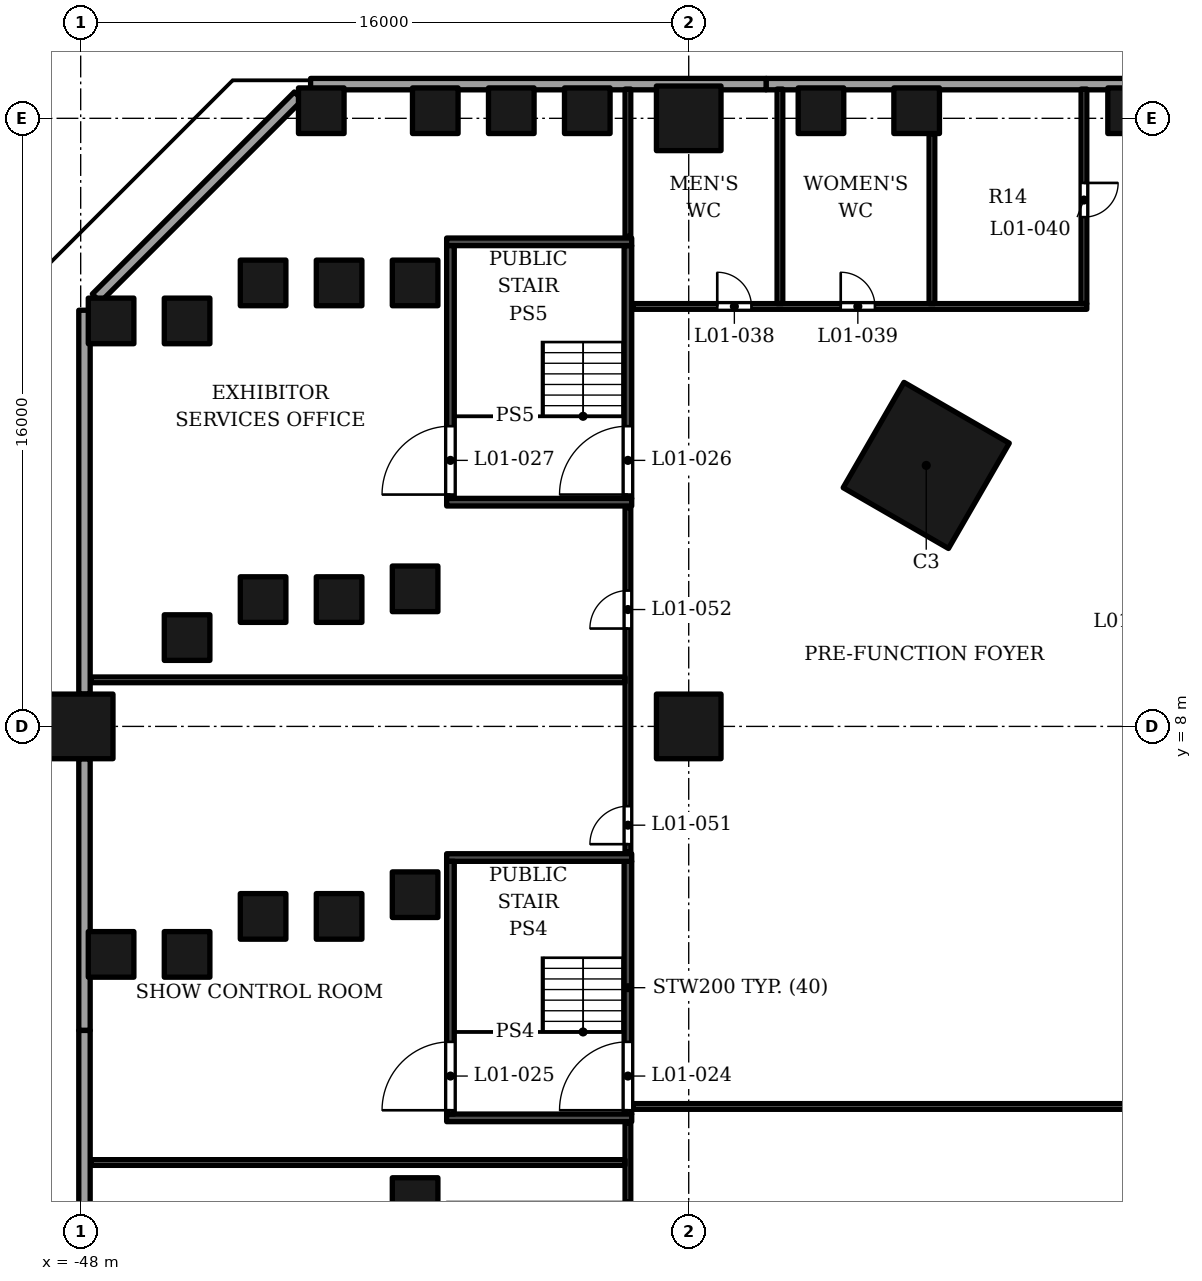
"""IFC4 building model, lengths in metres.
Left out: names, types, materials, properties, quantities, classifications, styles, units other than length and angle.
Written with IfcOpenShell. Run it as: python <this file> out.ifc"""

import sys

from ifc_helpers import new_model, si_unit, direction, frame, frame_2d, origin, origin_2d, place, context, subcontext, project, spatial, rectangle, extrude, element, fill, save


model = new_model("IFC4")
c1 = context("Model", 3, precision=1e-05, world=origin(), true_north=direction((0.0, 1.0)))
c2 = subcontext(c1, "Body", "Model", "MODEL_VIEW")
j1 = project(units=[si_unit("LENGTHUNIT", "METRE"), si_unit("PLANEANGLEUNIT", "RADIAN")], contexts=[c1])
p1 = place(None, origin())
s1 = spatial("IfcSite", under=j1, at=p1, CompositionType="ELEMENT")
p2 = place(p1, origin())
s2 = spatial("IfcBuilding", under=s1, at=p2, CompositionType="ELEMENT")
p3 = place(p2, frame((0.0, 0.0, 9.0)))
s3 = spatial("IfcBuildingStorey", under=s2, at=p3, CompositionType="ELEMENT", Elevation=9.0)
for number, where, z_axis, x_axis in (
    (1, (-48.0, 8.0, 0.0), (0.0, 0.0, 1.0), (1.0, 0.0, 0.0)),
    (2, (-32.0, 8.0, 0.0), (0.0, 0.0, 1.0), (1.0, 0.0, 0.0)),
    (3, (-32.0, 24.0, 0.0), (0.0, 0.0, 1.0), (1.0, 0.0, 0.0)),
):
    element("IfcColumn", number, at=place(p3, frame(where, z_axis=z_axis, x_axis=x_axis)), inside=s3, PredefinedType="COLUMN", context=c2, shape_type="SweptSolid", body=[
        extrude(rectangle(XDim=1.7, YDim=1.7, at=origin_2d()), origin(), (0.0, 0.0, 1.0), 11.0),
    ])
for number, where, z_axis, x_axis in (
    (4, (-39.2, 19.669, 0.0), (0.0, 0.0, 1.0), (1.0, 0.0, 0.0)),
    (5, (-34.669, 24.2, 0.0), (0.0, 0.0, 1.0), (1.0, 0.0, 0.0)),
    (6, (-39.2, -4.476, 0.0), (0.0, 0.0, 1.0), (1.0, 0.0, 0.0)),
    (7, (-39.2, 3.572, 0.0), (0.0, 0.0, 1.0), (1.0, 0.0, 0.0)),
    (8, (-39.2, 11.62, 0.0), (0.0, 0.0, 1.0), (1.0, 0.0, 0.0)),
    (9, (-26.002, 24.2, 0.0), (0.0, 0.0, 1.0), (1.0, 0.0, 0.0)),
    (10, (-41.2, 19.669, 0.0), (0.0, 0.0, 1.0), (1.0, 0.0, 0.0)),
    (11, (-36.669, 24.2, 0.0), (0.0, 0.0, 1.0), (1.0, 0.0, 0.0)),
    (12, (-41.2, 3.001, 0.0), (0.0, 0.0, 1.0), (1.0, 0.0, 0.0)),
    (13, (-41.2, 11.337, 0.0), (0.0, 0.0, 1.0), (1.0, 0.0, 0.0)),
    (14, (-28.52, 24.2, 0.0), (0.0, 0.0, 1.0), (1.0, 0.0, 0.0)),
    (15, (-20.372, 24.2, 0.0), (0.0, 0.0, 1.0), (1.0, 0.0, 0.0)),
    (16, (-43.2, 19.669, 0.0), (0.0, 0.0, 1.0), (1.0, 0.0, 0.0)),
    (17, (-38.669, 24.2, 0.0), (0.0, 0.0, 1.0), (1.0, 0.0, 0.0)),
    (18, (-43.2, 3.001, 0.0), (0.0, 0.0, 1.0), (1.0, 0.0, 0.0)),
    (19, (-43.2, 11.337, 0.0), (0.0, 0.0, 1.0), (1.0, 0.0, 0.0)),
    (20, (-45.2, 18.669, 0.0), (0.0, 0.0, 1.0), (1.0, 0.0, 0.0)),
    (21, (-45.2, 2.001, 0.0), (0.0, 0.0, 1.0), (1.0, 0.0, 0.0)),
    (22, (-45.2, 10.337, 0.0), (0.0, 0.0, 1.0), (1.0, 0.0, 0.0)),
    (23, (-47.2, 18.669, 0.0), (0.0, 0.0, 1.0), (1.0, 0.0, 0.0)),
    (24, (-41.669, 24.2, 0.0), (0.0, 0.0, 1.0), (1.0, 0.0, 0.0)),
    (25, (-47.2, 2.001, 0.0), (0.0, 0.0, 1.0), (1.0, 0.0, 0.0)),
):
    element("IfcColumn", number, at=place(p3, frame(where, z_axis=z_axis, x_axis=x_axis)), inside=s3, PredefinedType="COLUMN", context=c2, shape_type="SweptSolid", body=[
        extrude(rectangle(XDim=1.2, YDim=1.2, at=origin_2d()), origin(), (0.0, 0.0, 1.0), 11.0),
    ])
p4 = place(p3, frame((-25.75, 14.867, 0.0), z_axis=(0.0, 0.0, 1.0), x_axis=(0.866025386331, -0.50000003023, 0.0)))
e26 = element("IfcColumn", 26, at=p4, inside=s3, PredefinedType="COLUMN", context=c2, shape_type="SweptSolid", body=[
    extrude(rectangle(XDim=3.2, YDim=3.2, at=origin_2d()), origin(), (0.0, 0.0, 1.0), 11.0),
])
p5 = place(p3, frame((-17.979, 24.9, 0.0), z_axis=(0.0, 0.0, 1.0), x_axis=(-1.0, 0.0, 0.0)))
e27 = element("IfcWall", 27, at=p5, inside=s3, PredefinedType="SOLIDWALL", context=c2, shape_type="SweptSolid", body=[
    extrude(rectangle(XDim=11.986, YDim=0.3, at=frame_2d((5.993, 0.0))), origin(), (0.0, 0.0, 1.0), 9.6),
])
p6 = place(p3, frame((-29.964, 24.9, 0.0), z_axis=(0.0, 0.0, 1.0), x_axis=(-1.0, 0.0, 0.0)))
e28 = element("IfcWall", 28, at=p6, inside=s3, PredefinedType="SOLIDWALL", context=c2, shape_type="SweptSolid", body=[
    extrude(rectangle(XDim=11.986, YDim=0.3, at=frame_2d((5.993, 0.0))), origin(), (0.0, 0.0, 1.0), 9.6),
])
p7 = place(p3, frame((-42.271, 24.588, 0.0), z_axis=(0.0, 0.0, 1.0), x_axis=(-0.707106781187, -0.707106781187, 0.0)))
e29 = element("IfcWall", 29, at=p7, inside=s3, PredefinedType="SOLIDWALL", context=c2, shape_type="SweptSolid", body=[
    extrude(rectangle(XDim=7.519, YDim=0.3, at=frame_2d((3.759, 0.0))), origin(), (0.0, 0.0, 1.0), 9.6),
])
p8 = place(p3, frame((-47.9, 18.95, 0.0), z_axis=(0.0, 0.0, 1.0), x_axis=(0.0, -1.0, 0.0)))
e30 = element("IfcWall", 30, at=p8, inside=s3, PredefinedType="SOLIDWALL", context=c2, shape_type="SweptSolid", body=[
    extrude(rectangle(XDim=10.098, YDim=0.3, at=frame_2d((5.049, 0.0))), origin(), (0.0, 0.0, 1.0), 9.6),
])
for number, where, z_axis, x_axis in (
    (31, (-47.9, 7.148, 0.0), (0.0, 0.0, 1.0), (0.0, -1.0, 0.0)),
    (32, (-47.9, 0.0, 0.0), (0.0, 0.0, 1.0), (0.0, -1.0, 0.0)),
):
    element("IfcWall", number, at=place(p3, frame(where, z_axis=z_axis, x_axis=x_axis)), inside=s3, PredefinedType="SOLIDWALL", context=c2, shape_type="SweptSolid", body=[
        extrude(rectangle(XDim=7.148, YDim=0.3, at=frame_2d((3.574, 0.0))), origin(), (0.0, 0.0, 1.0), 9.6),
    ])
p9 = place(p3, frame((-40.75, 24.85, 11.0), z_axis=(0.0, 0.0, 1.0), x_axis=(-1.0, 0.0, 0.0)))
e33 = element("IfcWall", 33, at=p9, inside=s3, PredefinedType="PARAPET", context=c2, shape_type="SweptSolid", body=[
    extrude(rectangle(XDim=1.25, YDim=0.3, at=frame_2d((0.625, 0.0))), origin(), (0.0, 0.0, 1.0), 1.1),
])
p10 = place(p3, frame((-42.042, 24.745, 11.0), z_axis=(0.0, 0.0, 1.0), x_axis=(-0.7071215324, -0.707092029666, 0.0)))
e34 = element("IfcWall", 34, at=p10, inside=s3, PredefinedType="PARAPET", context=c2, shape_type="SweptSolid", body=[
    extrude(rectangle(XDim=8.275, YDim=0.3, at=frame_2d((4.138, 0.0))), origin(), (0.0, 0.0, 1.0), 1.1),
])
for number, where, z_axis, x_axis in (
    (35, (-47.85, 18.79, 11.0), (0.0, 0.0, 1.0), (0.0, -1.0, 0.0)),
    (36, (-47.85, 4.093, 11.0), (0.0, 0.0, 1.0), (0.0, -1.0, 0.0)),
):
    element("IfcWall", number, at=place(p3, frame(where, z_axis=z_axis, x_axis=x_axis)), inside=s3, PredefinedType="PARAPET", context=c2, shape_type="SweptSolid", body=[
        extrude(rectangle(XDim=14.698, YDim=0.3, at=frame_2d((7.349, 0.0))), origin(), (0.0, 0.0, 1.0), 1.1),
    ])
for number, where, z_axis, x_axis in (
    (37, (-38.37, -2.3, 0.0), (0.0, 0.0, 1.0), (1.0, 0.0, 0.0)),
    (38, (-38.37, 4.55, 0.0), (0.0, 0.0, 1.0), (1.0, 0.0, 0.0)),
):
    element("IfcWall", number, at=place(p3, frame(where, z_axis=z_axis, x_axis=x_axis)), inside=s3, PredefinedType="SOLIDWALL", context=c2, shape_type="SweptSolid", body=[
        extrude(rectangle(XDim=4.87, YDim=0.2, at=frame_2d((2.435, 0.0))), origin(), (0.0, 0.0, 1.0), 10.5),
    ])
p11 = place(p3, frame((-38.27, -2.2, 0.0), z_axis=(0.0, 0.0, 1.0), x_axis=(0.0, 1.0, 0.0)))
e39 = element("IfcWall", 39, at=p11, inside=s3, PredefinedType="SOLIDWALL", context=c2, shape_type="SweptSolid", body=[
    extrude(rectangle(XDim=6.65, YDim=0.2, at=frame_2d((3.325, 0.0))), origin(), (0.0, 0.0, 1.0), 10.5),
])
p12 = place(p11, frame((0.1, 0.0, 0.0)))
e40 = element("IfcOpeningElement", 40, at=p12, cuts=e39, PredefinedType="OPENING", context=c2, shape_type="SweptSolid", body=[
    extrude(rectangle(XDim=1.8, YDim=2.4, at=frame_2d((0.9, 1.2))), frame((0.0, 0.11, 0.0), z_axis=(0.0, -1.0, 0.0), x_axis=(1.0, 0.0, 0.0)), (0.0, 0.0, 1.0), 0.22),
])
p13 = place(p3, frame((-33.6, -2.2, 0.0), z_axis=(0.0, 0.0, 1.0), x_axis=(0.0, 1.0, 0.0)))
e41 = element("IfcWall", 41, at=p13, inside=s3, PredefinedType="SOLIDWALL", context=c2, shape_type="SweptSolid", body=[
    extrude(rectangle(XDim=6.65, YDim=0.2, at=frame_2d((3.325, 0.0))), origin(), (0.0, 0.0, 1.0), 10.5),
])
p14 = place(p13, frame((0.1, 0.0, 0.0)))
e42 = element("IfcOpeningElement", 42, at=p14, cuts=e41, PredefinedType="OPENING", context=c2, shape_type="SweptSolid", body=[
    extrude(rectangle(XDim=1.8, YDim=2.4, at=frame_2d((0.9, 1.2))), frame((0.0, 0.11, 0.0), z_axis=(0.0, -1.0, 0.0), x_axis=(1.0, 0.0, 0.0)), (0.0, 0.0, 1.0), 0.22),
])
for number, where, z_axis, x_axis in (
    (43, (-38.37, 13.9, 0.0), (0.0, 0.0, 1.0), (1.0, 0.0, 0.0)),
    (44, (-38.37, 20.75, 0.0), (0.0, 0.0, 1.0), (1.0, 0.0, 0.0)),
):
    element("IfcWall", number, at=place(p3, frame(where, z_axis=z_axis, x_axis=x_axis)), inside=s3, PredefinedType="SOLIDWALL", context=c2, shape_type="SweptSolid", body=[
        extrude(rectangle(XDim=4.87, YDim=0.2, at=frame_2d((2.435, 0.0))), origin(), (0.0, 0.0, 1.0), 10.5),
    ])
p15 = place(p3, frame((-38.27, 14.0, 0.0), z_axis=(0.0, 0.0, 1.0), x_axis=(0.0, 1.0, 0.0)))
e45 = element("IfcWall", 45, at=p15, inside=s3, PredefinedType="SOLIDWALL", context=c2, shape_type="SweptSolid", body=[
    extrude(rectangle(XDim=6.65, YDim=0.2, at=frame_2d((3.325, 0.0))), origin(), (0.0, 0.0, 1.0), 10.5),
])
p16 = place(p15, frame((0.1, 0.0, 0.0)))
e46 = element("IfcOpeningElement", 46, at=p16, cuts=e45, PredefinedType="OPENING", context=c2, shape_type="SweptSolid", body=[
    extrude(rectangle(XDim=1.8, YDim=2.4, at=frame_2d((0.9, 1.2))), frame((0.0, 0.11, 0.0), z_axis=(0.0, -1.0, 0.0), x_axis=(1.0, 0.0, 0.0)), (0.0, 0.0, 1.0), 0.22),
])
p17 = place(p3, frame((-33.6, 14.0, 0.0), z_axis=(0.0, 0.0, 1.0), x_axis=(0.0, 1.0, 0.0)))
e47 = element("IfcWall", 47, at=p17, inside=s3, PredefinedType="SOLIDWALL", context=c2, shape_type="SweptSolid", body=[
    extrude(rectangle(XDim=6.65, YDim=0.2, at=frame_2d((3.325, 0.0))), origin(), (0.0, 0.0, 1.0), 10.5),
])
p18 = place(p17, frame((0.1, 0.0, 0.0)))
e48 = element("IfcOpeningElement", 48, at=p18, cuts=e47, PredefinedType="OPENING", context=c2, shape_type="SweptSolid", body=[
    extrude(rectangle(XDim=1.8, YDim=2.4, at=frame_2d((0.9, 1.2))), frame((0.0, 0.11, 0.0), z_axis=(0.0, -1.0, 0.0), x_axis=(1.0, 0.0, 0.0)), (0.0, 0.0, 1.0), 0.22),
])
p19 = place(p3, frame((-33.6, -4.51, 0.0), z_axis=(0.0, 0.0, 1.0), x_axis=(0.0, 1.0, 0.0)))
e49 = element("IfcWall", 49, at=p19, inside=s3, PredefinedType="PARTITIONING", context=c2, shape_type="SweptSolid", body=[
    extrude(rectangle(XDim=2.07, YDim=0.15, at=frame_2d((1.035, 0.0))), origin(), (0.0, 0.0, 1.0), 10.5),
])
p20 = place(p3, frame((-47.72, -3.475, 0.0), z_axis=(0.0, 0.0, 1.0), x_axis=(1.0, 0.0, 0.0)))
e50 = element("IfcWall", 50, at=p20, inside=s3, PredefinedType="PARTITIONING", context=c2, shape_type="SweptSolid", body=[
    extrude(rectangle(XDim=14.045, YDim=0.15, at=frame_2d((7.022, 0.0))), origin(), (0.0, 0.0, 1.0), 9.6),
])
p21 = place(p3, frame((-33.46, -2.0, 0.0), z_axis=(0.0, 0.0, 1.0), x_axis=(1.0, 0.0, 0.0)))
e51 = element("IfcWall", 51, at=p21, inside=s3, PredefinedType="PARTITIONING", context=c2, shape_type="SweptSolid", body=[
    extrude(rectangle(XDim=66.92, YDim=0.15, at=frame_2d((33.46, 0.0))), origin(), (0.0, 0.0, 1.0), 9.3),
])
p22 = place(p21, frame((32.309, 0.0, 0.0)))
e52 = element("IfcOpeningElement", 52, at=p22, cuts=e51, PredefinedType="OPENING", context=c2, shape_type="SweptSolid", body=[
    extrude(rectangle(XDim=2.4, YDim=2.4, at=frame_2d((1.2, 1.2))), frame((0.0, 0.085, 0.0), z_axis=(0.0, -1.0, 0.0), x_axis=(1.0, 0.0, 0.0)), (0.0, 0.0, 1.0), 0.17),
])
p23 = place(p21, frame((27.559, 0.0, 0.0)))
e53 = element("IfcOpeningElement", 53, at=p23, cuts=e51, PredefinedType="OPENING", context=c2, shape_type="SweptSolid", body=[
    extrude(rectangle(XDim=2.4, YDim=2.4, at=frame_2d((1.2, 1.2))), frame((0.0, 0.085, 0.0), z_axis=(0.0, -1.0, 0.0), x_axis=(1.0, 0.0, 0.0)), (0.0, 0.0, 1.0), 0.17),
])
p24 = place(p21, frame((37.059, 0.0, 0.0)))
e54 = element("IfcOpeningElement", 54, at=p24, cuts=e51, PredefinedType="OPENING", context=c2, shape_type="SweptSolid", body=[
    extrude(rectangle(XDim=2.4, YDim=2.4, at=frame_2d((1.2, 1.2))), frame((0.0, 0.085, 0.0), z_axis=(0.0, -1.0, 0.0), x_axis=(1.0, 0.0, 0.0)), (0.0, 0.0, 1.0), 0.17),
])
p25 = place(p21, frame((22.809, 0.0, 0.0)))
e55 = element("IfcOpeningElement", 55, at=p25, cuts=e51, PredefinedType="OPENING", context=c2, shape_type="SweptSolid", body=[
    extrude(rectangle(XDim=2.4, YDim=2.4, at=frame_2d((1.2, 1.2))), frame((0.0, 0.085, 0.0), z_axis=(0.0, -1.0, 0.0), x_axis=(1.0, 0.0, 0.0)), (0.0, 0.0, 1.0), 0.17),
])
p26 = place(p3, frame((-33.6, 4.69, 0.0), z_axis=(0.0, 0.0, 1.0), x_axis=(0.0, 1.0, 0.0)))
e56 = element("IfcWall", 56, at=p26, inside=s3, PredefinedType="PARTITIONING", context=c2, shape_type="SweptSolid", body=[
    extrude(rectangle(XDim=9.07, YDim=0.15, at=frame_2d((4.535, 0.0))), origin(), (0.0, 0.0, 1.0), 9.3),
])
p27 = place(p26, frame((0.211, 0.0, 0.0)))
e57 = element("IfcOpeningElement", 57, at=p27, cuts=e56, PredefinedType="OPENING", context=c2, shape_type="SweptSolid", body=[
    extrude(rectangle(XDim=1.0, YDim=2.1, at=frame_2d((0.5, 1.05))), frame((0.0, 0.085, 0.0), z_axis=(0.0, -1.0, 0.0), x_axis=(1.0, 0.0, 0.0)), (0.0, 0.0, 1.0), 0.17),
])
p28 = place(p26, frame((5.885, 0.0, 0.0)))
e58 = element("IfcOpeningElement", 58, at=p28, cuts=e56, PredefinedType="OPENING", context=c2, shape_type="SweptSolid", body=[
    extrude(rectangle(XDim=1.0, YDim=2.1, at=frame_2d((0.5, 1.05))), frame((0.0, 0.085, 0.0), z_axis=(0.0, -1.0, 0.0), x_axis=(1.0, 0.0, 0.0)), (0.0, 0.0, 1.0), 0.17),
])
p29 = place(p3, frame((-47.72, 9.225, 0.0), z_axis=(0.0, 0.0, 1.0), x_axis=(1.0, 0.0, 0.0)))
e59 = element("IfcWall", 59, at=p29, inside=s3, PredefinedType="PARTITIONING", context=c2, shape_type="SweptSolid", body=[
    extrude(rectangle(XDim=14.045, YDim=0.15, at=frame_2d((7.022, 0.0))), origin(), (0.0, 0.0, 1.0), 9.6),
])
p30 = place(p3, frame((-33.46, 19.05, 0.0), z_axis=(0.0, 0.0, 1.0), x_axis=(1.0, 0.0, 0.0)))
e60 = element("IfcWall", 60, at=p30, inside=s3, PredefinedType="PARTITIONING", context=c2, shape_type="SweptSolid", body=[
    extrude(rectangle(XDim=11.935, YDim=0.15, at=frame_2d((5.968, 0.0))), origin(), (0.0, 0.0, 1.0), 9.3),
])
p31 = place(p30, frame((2.211, 0.0, 0.0)))
e61 = element("IfcOpeningElement", 61, at=p31, cuts=e60, PredefinedType="OPENING", context=c2, shape_type="SweptSolid", body=[
    extrude(rectangle(XDim=0.9, YDim=2.1, at=frame_2d((0.45, 1.05))), frame((0.0, 0.085, 0.0), z_axis=(0.0, -1.0, 0.0), x_axis=(1.0, 0.0, 0.0)), (0.0, 0.0, 1.0), 0.17),
])
p32 = place(p30, frame((5.46, 0.0, 0.0)))
e62 = element("IfcOpeningElement", 62, at=p32, cuts=e60, PredefinedType="OPENING", context=c2, shape_type="SweptSolid", body=[
    extrude(rectangle(XDim=0.9, YDim=2.1, at=frame_2d((0.45, 1.05))), frame((0.0, 0.085, 0.0), z_axis=(0.0, -1.0, 0.0), x_axis=(1.0, 0.0, 0.0)), (0.0, 0.0, 1.0), 0.17),
])
p33 = place(p3, frame((-29.6, 19.125, 0.0), z_axis=(0.0, 0.0, 1.0), x_axis=(0.0, 1.0, 0.0)))
e63 = element("IfcWall", 63, at=p33, inside=s3, PredefinedType="PARTITIONING", context=c2, shape_type="SweptSolid", body=[
    extrude(rectangle(XDim=5.645, YDim=0.15, at=frame_2d((2.823, 0.0))), origin(), (0.0, 0.0, 1.0), 9.3),
])
p34 = place(p3, frame((-25.6, 19.125, 0.0), z_axis=(0.0, 0.0, 1.0), x_axis=(0.0, 1.0, 0.0)))
e64 = element("IfcWall", 64, at=p34, inside=s3, PredefinedType="PARTITIONING", context=c2, shape_type="SweptSolid", body=[
    extrude(rectangle(XDim=4.475, YDim=0.15, at=frame_2d((2.238, 0.0))), origin(), (0.0, 0.0, 1.0), 10.5),
])
p35 = place(p3, frame((-21.6, 19.125, 0.0), z_axis=(0.0, 0.0, 1.0), x_axis=(0.0, 1.0, 0.0)))
e65 = element("IfcWall", 65, at=p35, inside=s3, PredefinedType="PARTITIONING", context=c2, shape_type="SweptSolid", body=[
    extrude(rectangle(XDim=5.645, YDim=0.15, at=frame_2d((2.823, 0.0))), origin(), (0.0, 0.0, 1.0), 9.3),
])
p36 = place(p35, frame((2.275, 0.0, 0.0)))
e66 = element("IfcOpeningElement", 66, at=p36, cuts=e65, PredefinedType="OPENING", context=c2, shape_type="SweptSolid", body=[
    extrude(rectangle(XDim=0.9, YDim=2.1, at=frame_2d((0.45, 1.05))), frame((0.0, 0.085, 0.0), z_axis=(0.0, -1.0, 0.0), x_axis=(1.0, 0.0, 0.0)), (0.0, 0.0, 1.0), 0.17),
])
p37 = place(p3, frame((-33.6, 20.89, 0.0), z_axis=(0.0, 0.0, 1.0), x_axis=(0.0, 1.0, 0.0)))
e67 = element("IfcWall", 67, at=p37, inside=s3, PredefinedType="PARTITIONING", context=c2, shape_type="SweptSolid", body=[
    extrude(rectangle(XDim=3.88, YDim=0.15, at=frame_2d((1.94, 0.0))), origin(), (0.0, 0.0, 1.0), 9.6),
])
p38 = place(p14, origin())
e68 = element("IfcDoor", 68, at=p38, inside=s3, OperationType="DOUBLE_DOOR_SINGLE_SWING", PredefinedType="DOOR", context=c2, shape_type="SweptSolid", body=[
    extrude(rectangle(XDim=1.8, YDim=2.4, at=frame_2d((0.9, 1.2))), frame((0.0, 0.025, 0.0), z_axis=(0.0, -1.0, 0.0), x_axis=(1.0, 0.0, 0.0)), (0.0, 0.0, 1.0), 0.05),
])
fill(e42, e68)
p39 = place(p12, origin())
e69 = element("IfcDoor", 69, at=p39, inside=s3, OperationType="DOUBLE_DOOR_SINGLE_SWING", PredefinedType="DOOR", context=c2, shape_type="SweptSolid", body=[
    extrude(rectangle(XDim=1.8, YDim=2.4, at=frame_2d((0.9, 1.2))), frame((0.0, 0.025, 0.0), z_axis=(0.0, -1.0, 0.0), x_axis=(1.0, 0.0, 0.0)), (0.0, 0.0, 1.0), 0.05),
])
fill(e40, e69)
p40 = place(p18, origin())
e70 = element("IfcDoor", 70, at=p40, inside=s3, OperationType="DOUBLE_DOOR_SINGLE_SWING", PredefinedType="DOOR", context=c2, shape_type="SweptSolid", body=[
    extrude(rectangle(XDim=1.8, YDim=2.4, at=frame_2d((0.9, 1.2))), frame((0.0, 0.025, 0.0), z_axis=(0.0, -1.0, 0.0), x_axis=(1.0, 0.0, 0.0)), (0.0, 0.0, 1.0), 0.05),
])
fill(e48, e70)
p41 = place(p16, origin())
e71 = element("IfcDoor", 71, at=p41, inside=s3, OperationType="DOUBLE_DOOR_SINGLE_SWING", PredefinedType="DOOR", context=c2, shape_type="SweptSolid", body=[
    extrude(rectangle(XDim=1.8, YDim=2.4, at=frame_2d((0.9, 1.2))), frame((0.0, 0.025, 0.0), z_axis=(0.0, -1.0, 0.0), x_axis=(1.0, 0.0, 0.0)), (0.0, 0.0, 1.0), 0.05),
])
fill(e46, e71)
p42 = place(p31, origin())
e72 = element("IfcDoor", 72, at=p42, inside=s3, OperationType="SINGLE_SWING_LEFT", PredefinedType="DOOR", context=c2, shape_type="SweptSolid", body=[
    extrude(rectangle(XDim=0.9, YDim=2.1, at=frame_2d((0.45, 1.05))), frame((0.0, 0.025, 0.0), z_axis=(0.0, -1.0, 0.0), x_axis=(1.0, 0.0, 0.0)), (0.0, 0.0, 1.0), 0.05),
])
fill(e61, e72)
p43 = place(p32, origin())
e73 = element("IfcDoor", 73, at=p43, inside=s3, OperationType="SINGLE_SWING_LEFT", PredefinedType="DOOR", context=c2, shape_type="SweptSolid", body=[
    extrude(rectangle(XDim=0.9, YDim=2.1, at=frame_2d((0.45, 1.05))), frame((0.0, 0.025, 0.0), z_axis=(0.0, -1.0, 0.0), x_axis=(1.0, 0.0, 0.0)), (0.0, 0.0, 1.0), 0.05),
])
fill(e62, e73)
p44 = place(p36, origin())
e74 = element("IfcDoor", 74, at=p44, inside=s3, OperationType="SINGLE_SWING_RIGHT", PredefinedType="DOOR", context=c2, shape_type="SweptSolid", body=[
    extrude(rectangle(XDim=0.9, YDim=2.1, at=frame_2d((0.45, 1.05))), frame((0.0, 0.025, 0.0), z_axis=(0.0, -1.0, 0.0), x_axis=(1.0, 0.0, 0.0)), (0.0, 0.0, 1.0), 0.05),
])
fill(e66, e74)
p45 = place(p27, origin())
e75 = element("IfcDoor", 75, at=p45, inside=s3, OperationType="SINGLE_SWING_LEFT", PredefinedType="DOOR", context=c2, shape_type="SweptSolid", body=[
    extrude(rectangle(XDim=1.0, YDim=2.1, at=frame_2d((0.5, 1.05))), frame((0.0, 0.025, 0.0), z_axis=(0.0, -1.0, 0.0), x_axis=(1.0, 0.0, 0.0)), (0.0, 0.0, 1.0), 0.05),
])
fill(e57, e75)
p46 = place(p28, origin())
e76 = element("IfcDoor", 76, at=p46, inside=s3, OperationType="SINGLE_SWING_LEFT", PredefinedType="DOOR", context=c2, shape_type="SweptSolid", body=[
    extrude(rectangle(XDim=1.0, YDim=2.1, at=frame_2d((0.5, 1.05))), frame((0.0, 0.025, 0.0), z_axis=(0.0, -1.0, 0.0), x_axis=(1.0, 0.0, 0.0)), (0.0, 0.0, 1.0), 0.05),
])
fill(e58, e76)
save(model, sys.argv[1])
